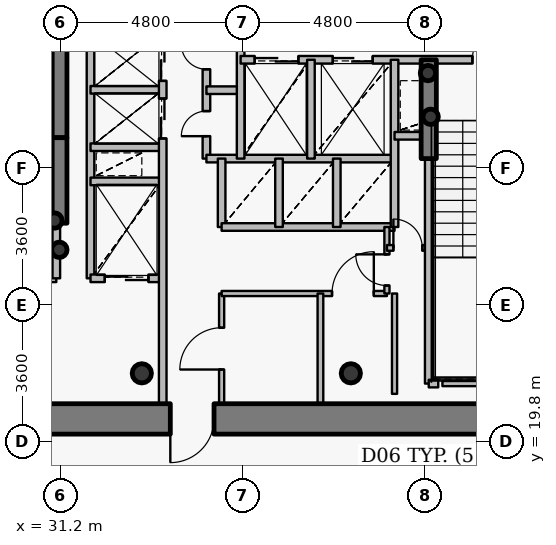
"""IFC4 building model, lengths in metres.
Left out: names, types, materials, properties, quantities, classifications, styles, units other than length and angle.
Written with IfcOpenShell. Run it as: python <this file> out.ifc"""

import sys

from ifc_helpers import new_model, si_unit, direction, frame, frame_2d, origin, origin_2d, place, context, subcontext, project, spatial, rectangle, hollow_circle, extrude, source, transform, mapped, element, fill, save


model = new_model("IFC4")
c1 = context("Model", 3, precision=1e-05, world=origin(), true_north=direction((0.0, 1.0)))
c2 = subcontext(c1, "Body", "Model", "MODEL_VIEW")
j1 = project(units=[si_unit("LENGTHUNIT", "METRE"), si_unit("PLANEANGLEUNIT", "RADIAN")], contexts=[c1])
p1 = place(None, origin())
s1 = spatial("IfcSite", under=j1, at=p1, CompositionType="ELEMENT")
p2 = place(p1, origin())
s2 = spatial("IfcBuilding", under=s1, at=p2, CompositionType="ELEMENT")
p3 = place(p2, frame((0.0, 0.0, 201.15)))
s3 = spatial("IfcBuildingStorey", under=s2, at=p3, CompositionType="ELEMENT", Elevation=201.15)
for number, where, z_axis, x_axis in (
    (1, (33.35, 21.6, 0.0), (0.0, 0.0, 1.0), (1.0, 0.0, 0.0)),
    (2, (38.85, 21.6, 0.0), (0.0, 0.0, 1.0), (1.0, 0.0, 0.0)),
):
    element("IfcColumn", number, at=place(p3, frame(where, z_axis=z_axis, x_axis=x_axis)), inside=s3, PredefinedType="COLUMN", context=c2, shape_type="SweptSolid", body=[
        extrude(hollow_circle(Radius=0.254, WallThickness=0.02, at=origin_2d()), origin(), (0.0, 0.0, 1.0), 3.75),
    ])
p4 = place(p3, frame((31.18, 27.8, 0.0), z_axis=(0.0, 0.0, 1.0), x_axis=(0.0, 1.0, 0.0)))
e3 = element("IfcWall", 3, at=p4, inside=s3, PredefinedType="SHEAR", context=c2, shape_type="SweptSolid", body=[
    extrude(rectangle(XDim=4.9, YDim=0.4, at=frame_2d((2.45, 0.0))), origin(), (0.0, 0.0, 1.0), 3.75),
])
for number, where, z_axis, x_axis in (
    (4, (31.05, 25.62, 0.0), (0.0, 0.0, 1.0), (1.0, 0.0, 0.0)),
    (5, (31.18, 24.85, 0.0), (0.0, 0.0, 1.0), (1.0, 0.0, 0.0)),
    (6, (40.95, 28.35, 0.0), (0.0, 0.0, 1.0), (1.0, 0.0, 0.0)),
    (7, (40.88, 29.5, 0.0), (0.0, 0.0, 1.0), (1.0, 0.0, 0.0)),
):
    element("IfcColumn", number, at=place(p3, frame(where, z_axis=z_axis, x_axis=x_axis)), inside=s3, PredefinedType="COLUMN", context=c2, shape_type="SweptSolid", body=[
        extrude(hollow_circle(Radius=0.203, WallThickness=0.016, at=origin_2d()), origin(), (0.0, 0.0, 1.0), 3.75),
    ])
p5 = place(p3, frame((44.8, 20.4, 0.0), z_axis=(0.0, 0.0, 1.0), x_axis=(-1.0, 0.0, 0.0)))
e8 = element("IfcWall", 8, at=p5, inside=s3, PredefinedType="SHEAR", context=c2, shape_type="SweptSolid", body=[
    extrude(rectangle(XDim=17.6, YDim=0.8, at=frame_2d((8.8, 0.0))), origin(), (0.0, 0.0, 1.0), 2.9),
])
p6 = place(p5, frame((9.55, 0.0, 0.0)))
e9 = element("IfcOpeningElement", 9, at=p6, cuts=e8, PredefinedType="OPENING", context=c2, shape_type="SweptSolid", body=[
    extrude(rectangle(XDim=1.15, YDim=2.15, at=origin_2d()), frame((0.575, 0.41, 1.075), z_axis=(0.0, -1.0, 0.0), x_axis=(1.0, 0.0, 0.0)), (0.0, 0.0, 1.0), 0.82),
])
p7 = place(p3, frame((31.18, 25.55, 0.0), z_axis=(0.0, 0.0, 1.0), x_axis=(0.0, 1.0, 0.0)))
e10 = element("IfcWall", 10, at=p7, inside=s3, PredefinedType="SHEAR", context=c2, shape_type="SweptSolid", body=[
    extrude(rectangle(XDim=2.25, YDim=0.4, at=frame_2d((1.125, 0.0))), origin(), (0.0, 0.0, 1.0), 3.05),
])
p8 = place(p3, frame((40.9, 27.25, 0.0), z_axis=(0.0, 0.0, 1.0), x_axis=(0.0, 1.0, 0.0)))
e11 = element("IfcWall", 11, at=p8, inside=s3, PredefinedType="SHEAR", context=c2, shape_type="SweptSolid", body=[
    extrude(rectangle(XDim=2.6, YDim=0.4, at=frame_2d((1.3, 0.0))), origin(), (0.0, 0.0, 1.0), 3.05),
])
p9 = place(p3, frame((27.56, 24.1, 0.0), z_axis=(0.0, 0.0, 1.0), x_axis=(1.0, 0.0, 0.0)))
e12 = element("IfcWall", 12, at=p9, inside=s3, PredefinedType="PARTITIONING", context=c2, shape_type="SweptSolid", body=[
    extrude(rectangle(XDim=3.54, YDim=0.2, at=frame_2d((1.77, 0.0))), origin(), (0.0, 0.0, 1.0), 3.45),
])
p10 = place(p9, frame((1.17, 0.0, 0.0)))
e13 = element("IfcOpeningElement", 13, at=p10, cuts=e12, PredefinedType="OPENING", context=c2, shape_type="SweptSolid", body=[
    extrude(rectangle(XDim=1.2, YDim=2.15, at=origin_2d()), frame((0.6, 0.11, 1.075), z_axis=(0.0, -1.0, 0.0), x_axis=(1.0, 0.0, 0.0)), (0.0, 0.0, 1.0), 0.22),
])
p11 = place(p3, frame((31.1, 24.1, 0.0), z_axis=(0.0, 0.0, 1.0), x_axis=(0.0, 1.0, 0.0)))
e14 = element("IfcWall", 14, at=p11, inside=s3, PredefinedType="PARTITIONING", context=c2, shape_type="SweptSolid", body=[
    extrude(rectangle(XDim=1.44, YDim=0.2, at=frame_2d((0.72, 0.0))), origin(), (0.0, 0.0, 1.0), 3.45),
])
p12 = place(p3, frame((32.0, 24.1, 0.0), z_axis=(0.0, 0.0, 1.0), x_axis=(0.0, 1.0, 0.0)))
e15 = element("IfcWall", 15, at=p12, inside=s3, PredefinedType="PARTITIONING", context=c2, shape_type="SweptSolid", body=[
    extrude(rectangle(XDim=8.0, YDim=0.2, at=frame_2d((4.0, 0.0))), origin(), (0.0, 0.0, 1.0), 3.45),
])
p13 = place(p3, frame((32.0, 24.1, 0.0), z_axis=(0.0, 0.0, 1.0), x_axis=(1.0, 0.0, 0.0)))
e16 = element("IfcWall", 16, at=p13, inside=s3, PredefinedType="PARTITIONING", context=c2, shape_type="SweptSolid", body=[
    extrude(rectangle(XDim=1.9, YDim=0.2, at=frame_2d((0.95, 0.0))), origin(), (0.0, 0.0, 1.0), 3.035),
])
p14 = place(p13, frame((0.375, 0.0, 0.0)))
e17 = element("IfcOpeningElement", 17, at=p14, cuts=e16, PredefinedType="OPENING", context=c2, shape_type="SweptSolid", body=[
    extrude(rectangle(XDim=1.15, YDim=2.15, at=origin_2d()), frame((0.575, 0.11, 1.075), z_axis=(0.0, -1.0, 0.0), x_axis=(1.0, 0.0, 0.0)), (0.0, 0.0, 1.0), 0.22),
])
for number, where, z_axis, x_axis in (
    (18, (32.0, 26.65, 0.0), (0.0, 0.0, 1.0), (1.0, 0.0, 0.0)),
    (19, (32.0, 27.55, 0.0), (0.0, 0.0, 1.0), (1.0, 0.0, 0.0)),
    (20, (32.0, 29.06, 0.0), (0.0, 0.0, 1.0), (1.0, 0.0, 0.0)),
):
    element("IfcWall", number, at=place(p3, frame(where, z_axis=z_axis, x_axis=x_axis)), inside=s3, PredefinedType="PARTITIONING", context=c2, shape_type="SweptSolid", body=[
        extrude(rectangle(XDim=1.9, YDim=0.2, at=frame_2d((0.95, 0.0))), origin(), (0.0, 0.0, 1.0), 3.035),
    ])
p15 = place(p3, frame((33.9, 20.8, 0.0), z_axis=(0.0, 0.0, 1.0), x_axis=(0.0, 1.0, 0.0)))
e21 = element("IfcWall", 21, at=p15, inside=s3, PredefinedType="PARTITIONING", context=c2, shape_type="SweptSolid", body=[
    extrude(rectangle(XDim=11.3, YDim=0.2, at=frame_2d((5.65, 0.0))), origin(), (0.0, 0.0, 1.0), 3.035),
])
p16 = place(p15, frame((6.98, 0.0, 0.0)))
e22 = element("IfcOpeningElement", 22, at=p16, cuts=e21, PredefinedType="OPENING", context=c2, shape_type="SweptSolid", body=[
    extrude(rectangle(XDim=1.05, YDim=2.15, at=origin_2d()), frame((0.525, 0.11, 1.075), z_axis=(0.0, -1.0, 0.0), x_axis=(1.0, 0.0, 0.0)), (0.0, 0.0, 1.0), 0.22),
])
p17 = place(p15, frame((8.495, 0.0, 0.0)))
e23 = element("IfcOpeningElement", 23, at=p17, cuts=e21, PredefinedType="OPENING", context=c2, shape_type="SweptSolid", body=[
    extrude(rectangle(XDim=1.05, YDim=2.15, at=origin_2d()), frame((0.525, 0.11, 1.075), z_axis=(0.0, -1.0, 0.0), x_axis=(1.0, 0.0, 0.0)), (0.0, 0.0, 1.0), 0.22),
])
p18 = place(p15, frame((9.995, 0.0, 0.0)))
e24 = element("IfcOpeningElement", 24, at=p18, cuts=e21, PredefinedType="OPENING", context=c2, shape_type="SweptSolid", body=[
    extrude(rectangle(XDim=1.05, YDim=2.15, at=origin_2d()), frame((0.525, 0.11, 1.075), z_axis=(0.0, -1.0, 0.0), x_axis=(1.0, 0.0, 0.0)), (0.0, 0.0, 1.0), 0.22),
])
p19 = place(p3, frame((35.05, 27.25, 0.0), z_axis=(0.0, 0.0, 1.0), x_axis=(0.0, 1.0, 0.0)))
e25 = element("IfcWall", 25, at=p19, inside=s3, PredefinedType="PARTITIONING", context=c2, shape_type="SweptSolid", body=[
    extrude(rectangle(XDim=3.6, YDim=0.2, at=frame_2d((1.8, 0.0))), origin(), (0.0, 0.0, 1.0), 3.45),
])
p20 = place(p19, frame((0.59, 0.0, 0.0)))
e26 = element("IfcOpeningElement", 26, at=p20, cuts=e25, PredefinedType="OPENING", context=c2, shape_type="SweptSolid", body=[
    extrude(rectangle(XDim=0.66, YDim=2.05, at=origin_2d()), frame((0.33, 0.11, 1.025), z_axis=(0.0, -1.0, 0.0), x_axis=(1.0, 0.0, 0.0)), (0.0, 0.0, 1.0), 0.22),
])
p21 = place(p19, frame((2.35, 0.0, 0.0)))
e27 = element("IfcOpeningElement", 27, at=p21, cuts=e25, PredefinedType="OPENING", context=c2, shape_type="SweptSolid", body=[
    extrude(rectangle(XDim=0.66, YDim=2.05, at=origin_2d()), frame((0.33, 0.11, 1.025), z_axis=(0.0, -1.0, 0.0), x_axis=(1.0, 0.0, 0.0)), (0.0, 0.0, 1.0), 0.22),
])
p22 = place(p3, frame((35.05, 27.25, 0.0), z_axis=(0.0, 0.0, 1.0), x_axis=(1.0, 0.0, 0.0)))
e28 = element("IfcWall", 28, at=p22, inside=s3, PredefinedType="PARTITIONING", context=c2, shape_type="SweptSolid", body=[
    extrude(rectangle(XDim=4.95, YDim=0.2, at=frame_2d((2.475, 0.0))), origin(), (0.0, 0.0, 1.0), 3.035),
])
p23 = place(p3, frame((35.05, 29.05, 0.0), z_axis=(0.0, 0.0, 1.0), x_axis=(1.0, 0.0, 0.0)))
e29 = element("IfcWall", 29, at=p23, inside=s3, PredefinedType="PARTITIONING", context=c2, shape_type="SweptSolid", body=[
    extrude(rectangle(XDim=0.9, YDim=0.2, at=frame_2d((0.45, 0.0))), origin(), (0.0, 0.0, 1.0), 3.45),
])
p24 = place(p3, frame((35.45, 20.8, 0.0), z_axis=(0.0, 0.0, 1.0), x_axis=(0.0, 1.0, 0.0)))
e30 = element("IfcWall", 30, at=p24, inside=s3, PredefinedType="PARTITIONING", context=c2, shape_type="SweptSolid", body=[
    extrude(rectangle(XDim=2.9, YDim=0.135, at=frame_2d((1.45, 0.0))), origin(), (0.0, 0.0, 1.0), 3.035),
])
p25 = place(p24, frame((0.9, 0.0, 0.0)))
e31 = element("IfcOpeningElement", 31, at=p25, cuts=e30, PredefinedType="OPENING", context=c2, shape_type="SweptSolid", body=[
    extrude(rectangle(XDim=1.1, YDim=2.15, at=origin_2d()), frame((0.55, 0.078, 1.075), z_axis=(0.0, -1.0, 0.0), x_axis=(1.0, 0.0, 0.0)), (0.0, 0.0, 1.0), 0.155),
])
p26 = place(p3, frame((35.45, 23.7, 0.0), z_axis=(0.0, 0.0, 1.0), x_axis=(1.0, 0.0, 0.0)))
e32 = element("IfcWall", 32, at=p26, inside=s3, PredefinedType="PARTITIONING", context=c2, shape_type="SweptSolid", body=[
    extrude(rectangle(XDim=4.35, YDim=0.135, at=frame_2d((2.175, 0.0))), origin(), (0.0, 0.0, 1.0), 3.035),
])
p27 = place(p26, frame((2.905, 0.0, 0.0)))
e33 = element("IfcOpeningElement", 33, at=p27, cuts=e32, PredefinedType="OPENING", context=c2, shape_type="SweptSolid", body=[
    extrude(rectangle(XDim=1.1, YDim=2.15, at=origin_2d()), frame((0.55, 0.078, 1.075), z_axis=(0.0, -1.0, 0.0), x_axis=(1.0, 0.0, 0.0)), (0.0, 0.0, 1.0), 0.155),
])
p28 = place(p3, frame((35.45, 25.45, 0.0), z_axis=(0.0, 0.0, 1.0), x_axis=(0.0, 1.0, 0.0)))
e34 = element("IfcWall", 34, at=p28, inside=s3, PredefinedType="PARTITIONING", context=c2, shape_type="SweptSolid", body=[
    extrude(rectangle(XDim=1.8, YDim=0.2, at=frame_2d((0.9, 0.0))), origin(), (0.0, 0.0, 1.0), 3.45),
])
p29 = place(p3, frame((35.45, 25.45, 0.0), z_axis=(0.0, 0.0, 1.0), x_axis=(1.0, 0.0, 0.0)))
e35 = element("IfcWall", 35, at=p29, inside=s3, PredefinedType="PARTITIONING", context=c2, shape_type="SweptSolid", body=[
    extrude(rectangle(XDim=4.55, YDim=0.2, at=frame_2d((2.275, 0.0))), origin(), (0.0, 0.0, 1.0), 3.035),
])
p30 = place(p3, frame((35.95, 27.25, 0.0), z_axis=(0.0, 0.0, 1.0), x_axis=(0.0, 1.0, 0.0)))
e36 = element("IfcWall", 36, at=p30, inside=s3, PredefinedType="PARTITIONING", context=c2, shape_type="SweptSolid", body=[
    extrude(rectangle(XDim=3.8, YDim=0.2, at=frame_2d((1.9, 0.0))), origin(), (0.0, 0.0, 1.0), 3.45),
])
p31 = place(p3, frame((35.95, 29.85, 0.0), z_axis=(0.0, 0.0, 1.0), x_axis=(1.0, 0.0, 0.0)))
e37 = element("IfcWall", 37, at=p31, inside=s3, PredefinedType="PARTITIONING", context=c2, shape_type="SweptSolid", body=[
    extrude(rectangle(XDim=8.49, YDim=0.2, at=frame_2d((4.245, 0.0))), origin(), (0.0, 0.0, 1.0), 3.035),
])
p32 = place(p31, frame((6.1, 0.0, 0.0)))
e38 = element("IfcOpeningElement", 38, at=p32, cuts=e37, PredefinedType="OPENING", context=c2, shape_type="SweptSolid", body=[
    extrude(rectangle(XDim=1.2, YDim=2.15, at=origin_2d()), frame((0.6, 0.11, 1.075), z_axis=(0.0, -1.0, 0.0), x_axis=(1.0, 0.0, 0.0)), (0.0, 0.0, 1.0), 0.22),
])
p33 = place(p31, frame((0.37, 0.0, 0.0)))
e39 = element("IfcOpeningElement", 39, at=p33, cuts=e37, PredefinedType="OPENING", context=c2, shape_type="SweptSolid", body=[
    extrude(rectangle(XDim=1.15, YDim=2.15, at=origin_2d()), frame((0.575, 0.11, 1.075), z_axis=(0.0, -1.0, 0.0), x_axis=(1.0, 0.0, 0.0)), (0.0, 0.0, 1.0), 0.22),
])
p34 = place(p31, frame((2.425, 0.0, 0.0)))
e40 = element("IfcOpeningElement", 40, at=p34, cuts=e37, PredefinedType="OPENING", context=c2, shape_type="SweptSolid", body=[
    extrude(rectangle(XDim=1.05, YDim=2.15, at=origin_2d()), frame((0.525, 0.11, 1.075), z_axis=(0.0, -1.0, 0.0), x_axis=(1.0, 0.0, 0.0)), (0.0, 0.0, 1.0), 0.22),
])
p35 = place(p3, frame((36.96, 25.45, 0.0), z_axis=(0.0, 0.0, 1.0), x_axis=(0.0, 1.0, 0.0)))
e41 = element("IfcWall", 41, at=p35, inside=s3, PredefinedType="PARTITIONING", context=c2, shape_type="SweptSolid", body=[
    extrude(rectangle(XDim=1.8, YDim=0.2, at=frame_2d((0.9, 0.0))), origin(), (0.0, 0.0, 1.0), 3.45),
])
p36 = place(p3, frame((37.8, 27.25, 0.0), z_axis=(0.0, 0.0, 1.0), x_axis=(0.0, 1.0, 0.0)))
e42 = element("IfcWall", 42, at=p36, inside=s3, PredefinedType="PARTITIONING", context=c2, shape_type="SweptSolid", body=[
    extrude(rectangle(XDim=2.6, YDim=0.2, at=frame_2d((1.3, 0.0))), origin(), (0.0, 0.0, 1.0), 3.45),
])
p37 = place(p3, frame((38.05, 20.18, 0.0), z_axis=(0.0, 0.0, 1.0), x_axis=(0.0, 1.0, 0.0)))
e43 = element("IfcWall", 43, at=p37, inside=s3, PredefinedType="PARTITIONING", context=c2, shape_type="SweptSolid", body=[
    extrude(rectangle(XDim=3.52, YDim=0.15, at=frame_2d((1.76, 0.0))), origin(), (0.0, 0.0, 1.0), 2.885),
])
p38 = place(p3, frame((38.48, 25.45, 0.0), z_axis=(0.0, 0.0, 1.0), x_axis=(0.0, 1.0, 0.0)))
e44 = element("IfcWall", 44, at=p38, inside=s3, PredefinedType="PARTITIONING", context=c2, shape_type="SweptSolid", body=[
    extrude(rectangle(XDim=1.8, YDim=0.2, at=frame_2d((0.9, 0.0))), origin(), (0.0, 0.0, 1.0), 3.45),
])
p39 = place(p3, frame((39.8, 23.7, 0.0), z_axis=(0.0, 0.0, 1.0), x_axis=(0.0, 1.0, 0.0)))
e45 = element("IfcWall", 45, at=p39, inside=s3, PredefinedType="PARTITIONING", context=c2, shape_type="SweptSolid", body=[
    extrude(rectangle(XDim=1.75, YDim=0.135, at=frame_2d((0.875, 0.0))), origin(), (0.0, 0.0, 1.0), 3.45),
])
p40 = place(p39, frame((0.21, 0.0, 0.0)))
e46 = element("IfcOpeningElement", 46, at=p40, cuts=e45, PredefinedType="OPENING", context=c2, shape_type="SweptSolid", body=[
    extrude(rectangle(XDim=0.82, YDim=2.1, at=origin_2d()), frame((0.41, 0.078, 1.05), z_axis=(0.0, -1.0, 0.0), x_axis=(1.0, 0.0, 0.0)), (0.0, 0.0, 1.0), 0.155),
])
p41 = place(p3, frame((39.8, 24.9, 0.0), z_axis=(0.0, 0.0, 1.0), x_axis=(1.0, 0.0, 0.0)))
e47 = element("IfcWall", 47, at=p41, inside=s3, PredefinedType="PARTITIONING", context=c2, shape_type="SweptSolid", body=[
    extrude(rectangle(XDim=1.1, YDim=0.15, at=frame_2d((0.55, 0.0))), origin(), (0.0, 0.0, 1.0), 3.45),
])
p42 = place(p41, frame((0.17, 0.0, 0.0)))
e48 = element("IfcOpeningElement", 48, at=p42, cuts=e47, PredefinedType="OPENING", context=c2, shape_type="SweptSolid", body=[
    extrude(rectangle(XDim=0.76, YDim=2.1, at=origin_2d()), frame((0.38, 0.085, 1.05), z_axis=(0.0, -1.0, 0.0), x_axis=(1.0, 0.0, 0.0)), (0.0, 0.0, 1.0), 0.17),
])
p43 = place(p3, frame((40.0, 25.45, 0.0), z_axis=(0.0, 0.0, 1.0), x_axis=(0.0, 1.0, 0.0)))
e49 = element("IfcWall", 49, at=p43, inside=s3, PredefinedType="PARTITIONING", context=c2, shape_type="SweptSolid", body=[
    extrude(rectangle(XDim=4.4, YDim=0.2, at=frame_2d((2.2, 0.0))), origin(), (0.0, 0.0, 1.0), 3.45),
])
p44 = place(p3, frame((40.0, 27.85, 0.0), z_axis=(0.0, 0.0, 1.0), x_axis=(1.0, 0.0, 0.0)))
e50 = element("IfcWall", 50, at=p44, inside=s3, PredefinedType="PARTITIONING", context=c2, shape_type="SweptSolid", body=[
    extrude(rectangle(XDim=0.9, YDim=0.2, at=frame_2d((0.45, 0.0))), origin(), (0.0, 0.0, 1.0), 3.45),
])
p45 = place(p3, frame((40.9, 21.33, 0.0), z_axis=(0.0, 0.0, 1.0), x_axis=(0.0, 1.0, 0.0)))
e51 = element("IfcWall", 51, at=p45, inside=s3, PredefinedType="PARTITIONING", context=c2, shape_type="SweptSolid", body=[
    extrude(rectangle(XDim=5.91, YDim=0.2, at=frame_2d((2.955, 0.0))), origin(), (0.0, 0.0, 1.0), 2.985),
])
p46 = place(p3, frame((40.9, 21.33, 0.0), z_axis=(0.0, 0.0, 1.0), x_axis=(1.0, 0.0, 0.0)))
e52 = element("IfcWall", 52, at=p46, inside=s3, PredefinedType="PARTITIONING", context=c2, shape_type="SweptSolid", body=[
    extrude(rectangle(XDim=0.25, YDim=0.2, at=frame_2d((0.125, 0.0))), origin(), (0.0, 0.0, 1.0), 2.985),
])
p47 = place(p3, frame((44.08, 21.33, 0.0), z_axis=(0.0, 0.0, 1.0), x_axis=(-1.0, 0.0, 0.0)))
e53 = element("IfcWall", 53, at=p47, inside=s3, PredefinedType="PARTITIONING", context=c2, shape_type="SweptSolid", body=[
    extrude(rectangle(XDim=2.82, YDim=0.135, at=frame_2d((1.41, 0.0))), origin(), (0.0, 0.0, 1.0), 2.985),
])
p48 = place(p3, frame((40.0, 23.7, 0.0), z_axis=(0.0, 0.0, 1.0), x_axis=(0.0, -1.0, 0.0)))
e54 = element("IfcWall", 54, at=p48, inside=s3, PredefinedType="PARTITIONING", context=c2, shape_type="SweptSolid", body=[
    extrude(rectangle(XDim=2.64, YDim=0.135, at=frame_2d((1.32, 0.0))), origin(), (0.0, 0.0, 1.0), 2.985),
])
m1 = source(origin(), c2, "Body", "SweptSolid", [
    extrude(rectangle(XDim=1.15, YDim=2.15, at=origin_2d()), frame((0.575, 0.025, 1.075), z_axis=(0.0, -1.0, 0.0), x_axis=(1.0, 0.0, 0.0)), (0.0, 0.0, 1.0), 0.05),
])
p49 = place(p6, origin())
e55 = element("IfcDoor", 55, at=p49, inside=s3, OperationType="SINGLE_SWING_RIGHT", PredefinedType="DOOR", context=c2, shape_type="MappedRepresentation", body=[
    mapped(m1, transform((0.0, 0.0, 0.0), x_axis=(1.0, 0.0, 0.0), y_axis=(0.0, 1.0, 0.0), z_axis=(0.0, 0.0, 1.0), scale=1.0)),
])
fill(e9, e55)
m2 = source(origin(), c2, "Body", "SweptSolid", [
    extrude(rectangle(XDim=1.2, YDim=2.15, at=origin_2d()), frame((0.6, 0.025, 1.075), z_axis=(0.0, -1.0, 0.0), x_axis=(1.0, 0.0, 0.0)), (0.0, 0.0, 1.0), 0.05),
])
p50 = place(p32, origin())
e56 = element("IfcDoor", 56, at=p50, inside=s3, OperationType="SINGLE_SWING_RIGHT", PredefinedType="DOOR", context=c2, shape_type="MappedRepresentation", body=[
    mapped(m2, transform((0.0, 0.0, 0.0), x_axis=(1.0, 0.0, 0.0), y_axis=(0.0, 1.0, 0.0), z_axis=(0.0, 0.0, 1.0), scale=1.0)),
])
fill(e38, e56)
m3 = source(origin(), c2, "Body", "SweptSolid", [
    extrude(rectangle(XDim=1.15, YDim=2.15, at=origin_2d()), frame((0.575, 0.025, 1.075), z_axis=(0.0, -1.0, 0.0), x_axis=(1.0, 0.0, 0.0)), (0.0, 0.0, 1.0), 0.05),
])
p51 = place(p33, origin())
e57 = element("IfcDoor", 57, at=p51, inside=s3, OperationType="DOUBLE_DOOR_SLIDING", PredefinedType="USERDEFINED", context=c2, shape_type="MappedRepresentation", body=[
    mapped(m3, transform((0.0, 0.0, 0.0), x_axis=(1.0, 0.0, 0.0), y_axis=(0.0, 1.0, 0.0), z_axis=(0.0, 0.0, 1.0), scale=1.0)),
])
fill(e39, e57)
p52 = place(p14, origin())
e58 = element("IfcDoor", 58, at=p52, inside=s3, OperationType="DOUBLE_DOOR_SLIDING", PredefinedType="USERDEFINED", context=c2, shape_type="MappedRepresentation", body=[
    mapped(m3, transform((0.0, 0.0, 0.0), x_axis=(1.0, 0.0, 0.0), y_axis=(0.0, 1.0, 0.0), z_axis=(0.0, 0.0, 1.0), scale=1.0)),
])
fill(e17, e58)
m4 = source(origin(), c2, "Body", "SweptSolid", [
    extrude(rectangle(XDim=1.05, YDim=2.15, at=origin_2d()), frame((0.525, 0.025, 1.075), z_axis=(0.0, -1.0, 0.0), x_axis=(1.0, 0.0, 0.0)), (0.0, 0.0, 1.0), 0.05),
])
p53 = place(p34, origin())
e59 = element("IfcDoor", 59, at=p53, inside=s3, OperationType="DOUBLE_DOOR_SLIDING", PredefinedType="USERDEFINED", context=c2, shape_type="MappedRepresentation", body=[
    mapped(m4, transform((0.0, 0.0, 0.0), x_axis=(1.0, 0.0, 0.0), y_axis=(0.0, 1.0, 0.0), z_axis=(0.0, 0.0, 1.0), scale=1.0)),
])
fill(e40, e59)
p54 = place(p16, origin())
e60 = element("IfcDoor", 60, at=p54, inside=s3, OperationType="DOUBLE_DOOR_SLIDING", PredefinedType="USERDEFINED", context=c2, shape_type="MappedRepresentation", body=[
    mapped(m4, transform((0.0, 0.0, 0.0), x_axis=(1.0, 0.0, 0.0), y_axis=(0.0, 1.0, 0.0), z_axis=(0.0, 0.0, 1.0), scale=1.0)),
])
fill(e22, e60)
p55 = place(p17, origin())
e61 = element("IfcDoor", 61, at=p55, inside=s3, OperationType="DOUBLE_DOOR_SLIDING", PredefinedType="USERDEFINED", context=c2, shape_type="MappedRepresentation", body=[
    mapped(m4, transform((0.0, 0.0, 0.0), x_axis=(1.0, 0.0, 0.0), y_axis=(0.0, 1.0, 0.0), z_axis=(0.0, 0.0, 1.0), scale=1.0)),
])
fill(e23, e61)
m5 = source(origin(), c2, "Body", "SweptSolid", [
    extrude(rectangle(XDim=0.66, YDim=2.05, at=origin_2d()), frame((0.33, 0.025, 1.025), z_axis=(0.0, -1.0, 0.0), x_axis=(1.0, 0.0, 0.0)), (0.0, 0.0, 1.0), 0.05),
])
p56 = place(p20, origin())
e62 = element("IfcDoor", 62, at=p56, inside=s3, OperationType="SINGLE_SWING_LEFT", PredefinedType="USERDEFINED", context=c2, shape_type="MappedRepresentation", body=[
    mapped(m5, transform((0.0, 0.0, 0.0), x_axis=(1.0, 0.0, 0.0), y_axis=(0.0, 1.0, 0.0), z_axis=(0.0, 0.0, 1.0), scale=1.0)),
])
fill(e26, e62)
p57 = place(p21, origin())
e63 = element("IfcDoor", 63, at=p57, inside=s3, OperationType="SINGLE_SWING_RIGHT", PredefinedType="USERDEFINED", context=c2, shape_type="MappedRepresentation", body=[
    mapped(m5, transform((0.0, 0.0, 0.0), x_axis=(1.0, 0.0, 0.0), y_axis=(0.0, 1.0, 0.0), z_axis=(0.0, 0.0, 1.0), scale=1.0)),
])
fill(e27, e63)
m6 = source(origin(), c2, "Body", "SweptSolid", [
    extrude(rectangle(XDim=1.1, YDim=2.15, at=origin_2d()), frame((0.55, 0.025, 1.075), z_axis=(0.0, -1.0, 0.0), x_axis=(1.0, 0.0, 0.0)), (0.0, 0.0, 1.0), 0.05),
])
p58 = place(p25, origin())
e64 = element("IfcDoor", 64, at=p58, inside=s3, OperationType="SINGLE_SWING_LEFT", PredefinedType="DOOR", context=c2, shape_type="MappedRepresentation", body=[
    mapped(m6, transform((0.0, 0.0, 0.0), x_axis=(1.0, 0.0, 0.0), y_axis=(0.0, 1.0, 0.0), z_axis=(0.0, 0.0, 1.0), scale=1.0)),
])
fill(e31, e64)
p59 = place(p27, origin())
e65 = element("IfcDoor", 65, at=p59, inside=s3, OperationType="SINGLE_SWING_RIGHT", PredefinedType="DOOR", context=c2, shape_type="MappedRepresentation", body=[
    mapped(m6, transform((0.0, 0.0, 0.0), x_axis=(1.0, 0.0, 0.0), y_axis=(0.0, 1.0, 0.0), z_axis=(0.0, 0.0, 1.0), scale=1.0)),
])
fill(e33, e65)
m7 = source(origin(), c2, "Body", "SweptSolid", [
    extrude(rectangle(XDim=0.82, YDim=2.1, at=origin_2d()), frame((0.41, 0.025, 1.05), z_axis=(0.0, -1.0, 0.0), x_axis=(1.0, 0.0, 0.0)), (0.0, 0.0, 1.0), 0.05),
])
p60 = place(p40, origin())
e66 = element("IfcDoor", 66, at=p60, inside=s3, OperationType="SINGLE_SWING_RIGHT", PredefinedType="DOOR", context=c2, shape_type="MappedRepresentation", body=[
    mapped(m7, transform((0.0, 0.0, 0.0), x_axis=(1.0, 0.0, 0.0), y_axis=(0.0, 1.0, 0.0), z_axis=(0.0, 0.0, 1.0), scale=1.0)),
])
fill(e46, e66)
m8 = source(origin(), c2, "Body", "SweptSolid", [
    extrude(rectangle(XDim=0.76, YDim=2.1, at=origin_2d()), frame((0.38, 0.025, 1.05), z_axis=(0.0, -1.0, 0.0), x_axis=(1.0, 0.0, 0.0)), (0.0, 0.0, 1.0), 0.05),
])
p61 = place(p42, origin())
e67 = element("IfcDoor", 67, at=p61, inside=s3, OperationType="SINGLE_SWING_LEFT", PredefinedType="DOOR", context=c2, shape_type="MappedRepresentation", body=[
    mapped(m8, transform((0.0, 0.0, 0.0), x_axis=(1.0, 0.0, 0.0), y_axis=(0.0, 1.0, 0.0), z_axis=(0.0, 0.0, 1.0), scale=1.0)),
])
fill(e48, e67)
save(model, sys.argv[1])
